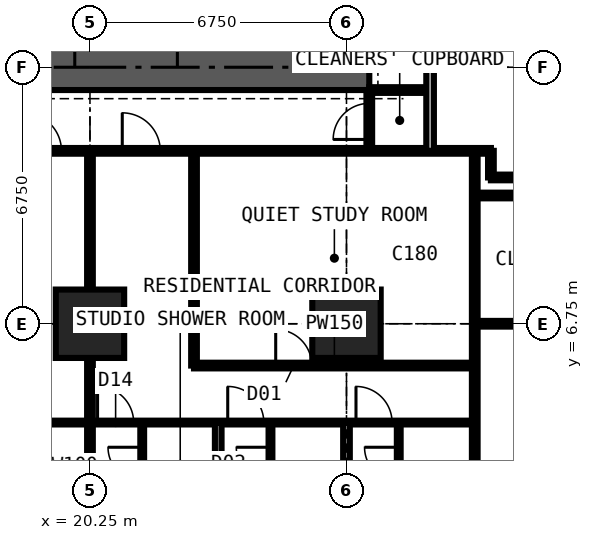
"""IFC4 building model, lengths in metres.
Left out: names, types, materials, properties, quantities, classifications, styles, units other than length and angle.
Written with IfcOpenShell. Run it as: python <this file> out.ifc"""

import sys

from ifc_helpers import new_model, si_unit, direction, frame, frame_2d, origin, origin_2d, place, context, subcontext, project, spatial, rectangle, extrude, element, fill, save


model = new_model("IFC4")
c1 = context("Model", 3, precision=1e-05, world=origin(), true_north=direction((0.0, 1.0)))
c2 = subcontext(c1, "Body", "Model", "MODEL_VIEW")
j1 = project(units=[si_unit("LENGTHUNIT", "METRE"), si_unit("PLANEANGLEUNIT", "RADIAN")], contexts=[c1])
p1 = place(None, origin())
s1 = spatial("IfcSite", under=j1, at=p1, CompositionType="ELEMENT")
p2 = place(p1, origin())
s2 = spatial("IfcBuilding", under=s1, at=p2, CompositionType="ELEMENT")
p3 = place(p2, frame((0.0, 0.0, 90.9)))
s3 = spatial("IfcBuildingStorey", under=s2, at=p3, CompositionType="ELEMENT", Elevation=90.9)
for number, where, z_axis, x_axis in (
    (1, (20.25, 6.75, 0.0), (0.0, 0.0, 1.0), (1.0, 0.0, 0.0)),
    (2, (27.0, 6.75, 0.0), (0.0, 0.0, 1.0), (1.0, 0.0, 0.0)),
):
    element("IfcColumn", number, at=place(p3, frame(where, z_axis=z_axis, x_axis=x_axis)), inside=s3, PredefinedType="COLUMN", context=c2, shape_type="SweptSolid", body=[
        extrude(rectangle(XDim=1.8, YDim=1.8, at=origin_2d()), origin(), (0.0, 0.0, 1.0), 3.6),
    ])
p4 = place(p3, frame((12.9, 13.5, 0.0), z_axis=(0.0, 0.0, 1.0), x_axis=(1.0, 0.0, 0.0)))
e3 = element("IfcWall", 3, at=p4, inside=s3, PredefinedType="SHEAR", context=c2, shape_type="SweptSolid", body=[
    extrude(rectangle(XDim=14.7, YDim=1.2, at=frame_2d((7.35, 0.0))), origin(), (0.0, 0.0, 1.0), 3.6),
])
p5 = place(p3, frame((6.75, 4.15, 0.0), z_axis=(0.0, 0.0, 1.0), x_axis=(1.0, 0.0, 0.0)))
e4 = element("IfcWall", 4, at=p5, inside=s3, PredefinedType="PARTITIONING", context=c2, shape_type="SweptSolid", body=[
    extrude(rectangle(XDim=23.625, YDim=0.1, at=frame_2d((11.812, 0.0))), origin(), (0.0, 0.0, 1.0), 3.375),
])
p6 = place(p5, frame((2.85, 0.0, 0.0)))
e5 = element("IfcOpeningElement", 5, at=p6, cuts=e4, PredefinedType="OPENING", context=c2, shape_type="SweptSolid", body=[
    extrude(rectangle(XDim=1.0, YDim=2.2, at=frame_2d((0.5, 1.1))), frame((0.0, 0.06, 0.0), z_axis=(0.0, -1.0, 0.0), x_axis=(1.0, 0.0, 0.0)), (0.0, 0.0, 1.0), 0.12),
])
p7 = place(p5, frame((6.95, 0.0, 0.0)))
e6 = element("IfcOpeningElement", 6, at=p7, cuts=e4, PredefinedType="OPENING", context=c2, shape_type="SweptSolid", body=[
    extrude(rectangle(XDim=0.95, YDim=2.2, at=frame_2d((0.475, 1.1))), frame((0.0, 0.06, 0.0), z_axis=(0.0, -1.0, 0.0), x_axis=(1.0, 0.0, 0.0)), (0.0, 0.0, 1.0), 0.12),
])
p8 = place(p5, frame((10.375, 0.0, 0.0)))
e7 = element("IfcOpeningElement", 7, at=p8, cuts=e4, PredefinedType="OPENING", context=c2, shape_type="SweptSolid", body=[
    extrude(rectangle(XDim=0.95, YDim=2.2, at=frame_2d((0.475, 1.1))), frame((0.0, 0.06, 0.0), z_axis=(0.0, -1.0, 0.0), x_axis=(1.0, 0.0, 0.0)), (0.0, 0.0, 1.0), 0.12),
])
p9 = place(p5, frame((13.7, 0.0, 0.0)))
e8 = element("IfcOpeningElement", 8, at=p9, cuts=e4, PredefinedType="OPENING", context=c2, shape_type="SweptSolid", body=[
    extrude(rectangle(XDim=0.95, YDim=2.2, at=frame_2d((0.475, 1.1))), frame((0.0, 0.06, 0.0), z_axis=(0.0, -1.0, 0.0), x_axis=(1.0, 0.0, 0.0)), (0.0, 0.0, 1.0), 0.12),
])
p10 = place(p5, frame((17.125, 0.0, 0.0)))
e9 = element("IfcOpeningElement", 9, at=p10, cuts=e4, PredefinedType="OPENING", context=c2, shape_type="SweptSolid", body=[
    extrude(rectangle(XDim=0.95, YDim=2.2, at=frame_2d((0.475, 1.1))), frame((0.0, 0.06, 0.0), z_axis=(0.0, -1.0, 0.0), x_axis=(1.0, 0.0, 0.0)), (0.0, 0.0, 1.0), 0.12),
])
p11 = place(p5, frame((20.5, 0.0, 0.0)))
e10 = element("IfcOpeningElement", 10, at=p11, cuts=e4, PredefinedType="OPENING", context=c2, shape_type="SweptSolid", body=[
    extrude(rectangle(XDim=0.95, YDim=2.2, at=frame_2d((0.475, 1.1))), frame((0.0, 0.06, 0.0), z_axis=(0.0, -1.0, 0.0), x_axis=(1.0, 0.0, 0.0)), (0.0, 0.0, 1.0), 0.12),
])
p12 = place(p3, frame((10.125, 11.3, 0.0), z_axis=(0.0, 0.0, 1.0), x_axis=(1.0, 0.0, 0.0)))
e11 = element("IfcWall", 11, at=p12, inside=s3, PredefinedType="PARTITIONING", context=c2, shape_type="SweptSolid", body=[
    extrude(rectangle(XDim=20.675, YDim=0.15, at=frame_2d((10.337, 0.0))), origin(), (0.0, 0.0, 1.0), 3.375),
])
p13 = place(p12, frame((8.375, 0.0, 0.0)))
e12 = element("IfcOpeningElement", 12, at=p13, cuts=e11, PredefinedType="OPENING", context=c2, shape_type="SweptSolid", body=[
    extrude(rectangle(XDim=1.0, YDim=2.2, at=frame_2d((0.5, 1.1))), frame((0.0, 0.085, 0.0), z_axis=(0.0, -1.0, 0.0), x_axis=(1.0, 0.0, 0.0)), (0.0, 0.0, 1.0), 0.17),
])
p14 = place(p12, frame((10.975, 0.0, 0.0)))
e13 = element("IfcOpeningElement", 13, at=p14, cuts=e11, PredefinedType="OPENING", context=c2, shape_type="SweptSolid", body=[
    extrude(rectangle(XDim=1.0, YDim=2.2, at=frame_2d((0.5, 1.1))), frame((0.0, 0.085, 0.0), z_axis=(0.0, -1.0, 0.0), x_axis=(1.0, 0.0, 0.0)), (0.0, 0.0, 1.0), 0.17),
])
p15 = place(p12, frame((3.925, 0.0, 0.0)))
e14 = element("IfcOpeningElement", 14, at=p15, cuts=e11, PredefinedType="OPENING", context=c2, shape_type="SweptSolid", body=[
    extrude(rectangle(XDim=0.95, YDim=2.2, at=frame_2d((0.475, 1.1))), frame((0.0, 0.085, 0.0), z_axis=(0.0, -1.0, 0.0), x_axis=(1.0, 0.0, 0.0)), (0.0, 0.0, 1.0), 0.17),
])
p16 = place(p3, frame((20.25, -0.734, 0.0), z_axis=(0.0, 0.0, 1.0), x_axis=(0.0, 1.0, 0.0)))
e15 = element("IfcWall", 15, at=p16, inside=s3, PredefinedType="PARTITIONING", context=c2, shape_type="SweptSolid", body=[
    extrude(rectangle(XDim=12.034, YDim=0.15, at=frame_2d((6.017, 0.0))), origin(), (0.0, 0.0, 1.0), 2.61),
])
p17 = place(p3, frame((21.625, 1.95, 0.0), z_axis=(0.0, 0.0, 1.0), x_axis=(0.0, 1.0, 0.0)))
e16 = element("IfcWall", 16, at=p17, inside=s3, PredefinedType="PARTITIONING", context=c2, shape_type="SweptSolid", body=[
    extrude(rectangle(XDim=2.2, YDim=0.1, at=frame_2d((1.1, 0.0))), origin(), (0.0, 0.0, 1.0), 3.375),
])
p18 = place(p17, frame((0.65, 0.0, 0.0)))
e17 = element("IfcOpeningElement", 17, at=p18, cuts=e16, PredefinedType="OPENING", context=c2, shape_type="SweptSolid", body=[
    extrude(rectangle(XDim=0.9, YDim=2.2, at=frame_2d((0.45, 1.1))), frame((0.0, 0.06, 0.0), z_axis=(0.0, -1.0, 0.0), x_axis=(1.0, 0.0, 0.0)), (0.0, 0.0, 1.0), 0.12),
])
p19 = place(p3, frame((22.988, 5.65, 0.0), z_axis=(0.0, 0.0, 1.0), x_axis=(1.0, 0.0, 0.0)))
e18 = element("IfcWall", 18, at=p19, inside=s3, PredefinedType="PARTITIONING", context=c2, shape_type="SweptSolid", body=[
    extrude(rectangle(XDim=7.387, YDim=0.15, at=frame_2d((3.694, 0.0))), origin(), (0.0, 0.0, 1.0), 3.375),
])
p20 = place(p19, frame((2.15, 0.0, 0.0)))
e19 = element("IfcOpeningElement", 19, at=p20, cuts=e18, PredefinedType="OPENING", context=c2, shape_type="SweptSolid", body=[
    extrude(rectangle(XDim=0.95, YDim=2.2, at=frame_2d((0.475, 1.1))), frame((0.0, 0.085, 0.0), z_axis=(0.0, -1.0, 0.0), x_axis=(1.0, 0.0, 0.0)), (0.0, 0.0, 1.0), 0.17),
])
p21 = place(p3, frame((22.988, 5.65, 0.0), z_axis=(0.0, 0.0, 1.0), x_axis=(0.0, 1.0, 0.0)))
e20 = element("IfcWall", 20, at=p21, inside=s3, PredefinedType="PARTITIONING", context=c2, shape_type="SweptSolid", body=[
    extrude(rectangle(XDim=5.65, YDim=0.15, at=frame_2d((2.825, 0.0))), origin(), (0.0, 0.0, 1.0), 3.375),
])
p22 = place(p3, frame((23.625, -0.734, 0.0), z_axis=(0.0, 0.0, 1.0), x_axis=(0.0, 1.0, 0.0)))
e21 = element("IfcWall", 21, at=p22, inside=s3, PredefinedType="PARTITIONING", context=c2, shape_type="SweptSolid", body=[
    extrude(rectangle(XDim=4.884, YDim=0.175, at=frame_2d((2.442, 0.0))), origin(), (0.0, 0.0, 1.0), 3.375),
])
p23 = place(p3, frame((25.0, 1.95, 0.0), z_axis=(0.0, 0.0, 1.0), x_axis=(0.0, 1.0, 0.0)))
e22 = element("IfcWall", 22, at=p23, inside=s3, PredefinedType="PARTITIONING", context=c2, shape_type="SweptSolid", body=[
    extrude(rectangle(XDim=2.2, YDim=0.1, at=frame_2d((1.1, 0.0))), origin(), (0.0, 0.0, 1.0), 3.375),
])
p24 = place(p23, frame((0.65, 0.0, 0.0)))
e23 = element("IfcOpeningElement", 23, at=p24, cuts=e22, PredefinedType="OPENING", context=c2, shape_type="SweptSolid", body=[
    extrude(rectangle(XDim=0.9, YDim=2.2, at=frame_2d((0.45, 1.1))), frame((0.0, 0.06, 0.0), z_axis=(0.0, -1.0, 0.0), x_axis=(1.0, 0.0, 0.0)), (0.0, 0.0, 1.0), 0.12),
])
p25 = place(p3, frame((27.0, -0.734, 0.0), z_axis=(0.0, 0.0, 1.0), x_axis=(0.0, 1.0, 0.0)))
e24 = element("IfcWall", 24, at=p25, inside=s3, PredefinedType="PARTITIONING", context=c2, shape_type="SweptSolid", body=[
    extrude(rectangle(XDim=4.884, YDim=0.175, at=frame_2d((2.442, 0.0))), origin(), (0.0, 0.0, 1.0), 2.877),
])
p26 = place(p3, frame((27.6, 11.3, 0.0), z_axis=(0.0, 0.0, 1.0), x_axis=(0.0, 1.0, 0.0)))
e25 = element("IfcWall", 25, at=p26, inside=s3, PredefinedType="PARTITIONING", context=c2, shape_type="SweptSolid", body=[
    extrude(rectangle(XDim=1.6, YDim=0.15, at=frame_2d((0.8, 0.0))), origin(), (0.0, 0.0, 1.0), 3.375),
])
p27 = place(p26, frame((0.3, 0.0, 0.0)))
e26 = element("IfcOpeningElement", 26, at=p27, cuts=e25, PredefinedType="OPENING", context=c2, shape_type="SweptSolid", body=[
    extrude(rectangle(XDim=0.95, YDim=2.2, at=frame_2d((0.475, 1.1))), frame((0.0, 0.085, 0.0), z_axis=(0.0, -1.0, 0.0), x_axis=(1.0, 0.0, 0.0)), (0.0, 0.0, 1.0), 0.17),
])
p28 = place(p3, frame((27.6, 12.9, 0.0), z_axis=(0.0, 0.0, 1.0), x_axis=(1.0, 0.0, 0.0)))
e27 = element("IfcWall", 27, at=p28, inside=s3, PredefinedType="PARTITIONING", context=c2, shape_type="SweptSolid", body=[
    extrude(rectangle(XDim=1.6, YDim=0.15, at=frame_2d((0.8, 0.0))), origin(), (0.0, 0.0, 1.0), 2.806),
])
p29 = place(p3, frame((28.375, 1.95, 0.0), z_axis=(0.0, 0.0, 1.0), x_axis=(0.0, 1.0, 0.0)))
e28 = element("IfcWall", 28, at=p29, inside=s3, PredefinedType="PARTITIONING", context=c2, shape_type="SweptSolid", body=[
    extrude(rectangle(XDim=2.2, YDim=0.1, at=frame_2d((1.1, 0.0))), origin(), (0.0, 0.0, 1.0), 3.375),
])
p30 = place(p29, frame((0.65, 0.0, 0.0)))
e29 = element("IfcOpeningElement", 29, at=p30, cuts=e28, PredefinedType="OPENING", context=c2, shape_type="SweptSolid", body=[
    extrude(rectangle(XDim=0.9, YDim=2.2, at=frame_2d((0.45, 1.1))), frame((0.0, 0.06, 0.0), z_axis=(0.0, -1.0, 0.0), x_axis=(1.0, 0.0, 0.0)), (0.0, 0.0, 1.0), 0.12),
])
p31 = place(p3, frame((29.2, 11.3, 0.0), z_axis=(0.0, 0.0, 1.0), x_axis=(0.0, 1.0, 0.0)))
e30 = element("IfcWall", 30, at=p31, inside=s3, PredefinedType="PARTITIONING", context=c2, shape_type="SweptSolid", body=[
    extrude(rectangle(XDim=17.9, YDim=0.2, at=frame_2d((8.95, 0.0))), origin(), (0.0, 0.0, 1.0), 3.375),
])
p32 = place(p31, frame((8.35, 0.0, 0.0)))
e31 = element("IfcOpeningElement", 31, at=p32, cuts=e30, PredefinedType="OPENING", context=c2, shape_type="SweptSolid", body=[
    extrude(rectangle(XDim=1.2, YDim=2.2, at=frame_2d((0.6, 1.1))), frame((0.0, 0.11, 0.0), z_axis=(0.0, -1.0, 0.0), x_axis=(1.0, 0.0, 0.0)), (0.0, 0.0, 1.0), 0.22),
])
p33 = place(p3, frame((30.375, -0.734, 0.0), z_axis=(0.0, 0.0, 1.0), x_axis=(0.0, 1.0, 0.0)))
e32 = element("IfcWall", 32, at=p33, inside=s3, PredefinedType="PARTITIONING", context=c2, shape_type="SweptSolid", body=[
    extrude(rectangle(XDim=12.034, YDim=0.15, at=frame_2d((6.017, 0.0))), origin(), (0.0, 0.0, 1.0), 3.375),
])
p34 = place(p3, frame((30.375, 6.75, 0.0), z_axis=(0.0, 0.0, 1.0), x_axis=(1.0, 0.0, 0.0)))
e33 = element("IfcWall", 33, at=p34, inside=s3, PredefinedType="PARTITIONING", context=c2, shape_type="SweptSolid", body=[
    extrude(rectangle(XDim=10.859, YDim=0.15, at=frame_2d((5.429, 0.0))), origin(), (0.0, 0.0, 1.0), 2.877),
])
p35 = place(p34, frame((1.45, 0.0, 0.0)))
e34 = element("IfcOpeningElement", 34, at=p35, cuts=e33, PredefinedType="OPENING", context=c2, shape_type="SweptSolid", body=[
    extrude(rectangle(XDim=1.0, YDim=2.2, at=frame_2d((0.5, 1.1))), frame((0.0, 0.085, 0.0), z_axis=(0.0, -1.0, 0.0), x_axis=(1.0, 0.0, 0.0)), (0.0, 0.0, 1.0), 0.17),
])
p36 = place(p3, frame((30.375, 10.125, 0.0), z_axis=(0.0, 0.0, 1.0), x_axis=(1.0, 0.0, 0.0)))
e35 = element("IfcWall", 35, at=p36, inside=s3, PredefinedType="PARTITIONING", context=c2, shape_type="SweptSolid", body=[
    extrude(rectangle(XDim=10.859, YDim=0.15, at=frame_2d((5.429, 0.0))), origin(), (0.0, 0.0, 1.0), 3.375),
])
p37 = place(p36, frame((2.5, 0.0, 0.0)))
e36 = element("IfcOpeningElement", 36, at=p37, cuts=e35, PredefinedType="OPENING", context=c2, shape_type="SweptSolid", body=[
    extrude(rectangle(XDim=1.0, YDim=2.2, at=frame_2d((0.5, 1.1))), frame((0.0, 0.085, 0.0), z_axis=(0.0, -1.0, 0.0), x_axis=(1.0, 0.0, 0.0)), (0.0, 0.0, 1.0), 0.17),
])
p38 = place(p3, frame((30.8, 10.6, 0.0), z_axis=(0.0, 0.0, 1.0), x_axis=(0.0, 1.0, 0.0)))
e37 = element("IfcWall", 37, at=p38, inside=s3, PredefinedType="PARTITIONING", context=c2, shape_type="SweptSolid", body=[
    extrude(rectangle(XDim=0.7, YDim=0.15, at=frame_2d((0.35, 0.0))), origin(), (0.0, 0.0, 1.0), 3.375),
])
p39 = place(p3, frame((30.8, 10.6, 0.0), z_axis=(0.0, 0.0, 1.0), x_axis=(1.0, 0.0, 0.0)))
e38 = element("IfcWall", 38, at=p39, inside=s3, PredefinedType="PARTITIONING", context=c2, shape_type="SweptSolid", body=[
    extrude(rectangle(XDim=1.85, YDim=0.15, at=frame_2d((0.925, 0.0))), origin(), (0.0, 0.0, 1.0), 3.375),
])
p40 = place(p27, origin())
e39 = element("IfcDoor", 39, at=p40, inside=s3, OperationType="SINGLE_SWING_LEFT", PredefinedType="DOOR", context=c2, shape_type="SweptSolid", body=[
    extrude(rectangle(XDim=0.95, YDim=2.2, at=frame_2d((0.475, 1.1))), frame((0.0, 0.025, 0.0), z_axis=(0.0, -1.0, 0.0), x_axis=(1.0, 0.0, 0.0)), (0.0, 0.0, 1.0), 0.05),
])
fill(e26, e39)
p41 = place(p13, origin())
e40 = element("IfcDoor", 40, at=p41, inside=s3, OperationType="SINGLE_SWING_LEFT", PredefinedType="DOOR", context=c2, shape_type="SweptSolid", body=[
    extrude(rectangle(XDim=1.0, YDim=2.2, at=frame_2d((0.5, 1.1))), frame((0.0, 0.025, 0.0), z_axis=(0.0, -1.0, 0.0), x_axis=(1.0, 0.0, 0.0)), (0.0, 0.0, 1.0), 0.05),
])
fill(e12, e40)
p42 = place(p9, origin())
e41 = element("IfcDoor", 41, at=p42, inside=s3, OperationType="SINGLE_SWING_LEFT", PredefinedType="DOOR", context=c2, shape_type="SweptSolid", body=[
    extrude(rectangle(XDim=0.95, YDim=2.2, at=frame_2d((0.475, 1.1))), frame((0.0, 0.025, 0.0), z_axis=(0.0, -1.0, 0.0), x_axis=(1.0, 0.0, 0.0)), (0.0, 0.0, 1.0), 0.05),
])
fill(e8, e41)
p43 = place(p18, origin())
e42 = element("IfcDoor", 42, at=p43, inside=s3, OperationType="SINGLE_SWING_RIGHT", PredefinedType="DOOR", context=c2, shape_type="SweptSolid", body=[
    extrude(rectangle(XDim=0.9, YDim=2.2, at=frame_2d((0.45, 1.1))), frame((0.0, 0.025, 0.0), z_axis=(0.0, -1.0, 0.0), x_axis=(1.0, 0.0, 0.0)), (0.0, 0.0, 1.0), 0.05),
])
fill(e17, e42)
p44 = place(p10, origin())
e43 = element("IfcDoor", 43, at=p44, inside=s3, OperationType="SINGLE_SWING_LEFT", PredefinedType="DOOR", context=c2, shape_type="SweptSolid", body=[
    extrude(rectangle(XDim=0.95, YDim=2.2, at=frame_2d((0.475, 1.1))), frame((0.0, 0.025, 0.0), z_axis=(0.0, -1.0, 0.0), x_axis=(1.0, 0.0, 0.0)), (0.0, 0.0, 1.0), 0.05),
])
fill(e9, e43)
p45 = place(p24, origin())
e44 = element("IfcDoor", 44, at=p45, inside=s3, OperationType="SINGLE_SWING_RIGHT", PredefinedType="DOOR", context=c2, shape_type="SweptSolid", body=[
    extrude(rectangle(XDim=0.9, YDim=2.2, at=frame_2d((0.45, 1.1))), frame((0.0, 0.025, 0.0), z_axis=(0.0, -1.0, 0.0), x_axis=(1.0, 0.0, 0.0)), (0.0, 0.0, 1.0), 0.05),
])
fill(e23, e44)
p46 = place(p11, origin())
e45 = element("IfcDoor", 45, at=p46, inside=s3, OperationType="SINGLE_SWING_LEFT", PredefinedType="DOOR", context=c2, shape_type="SweptSolid", body=[
    extrude(rectangle(XDim=0.95, YDim=2.2, at=frame_2d((0.475, 1.1))), frame((0.0, 0.025, 0.0), z_axis=(0.0, -1.0, 0.0), x_axis=(1.0, 0.0, 0.0)), (0.0, 0.0, 1.0), 0.05),
])
fill(e10, e45)
p47 = place(p30, origin())
e46 = element("IfcDoor", 46, at=p47, inside=s3, OperationType="SINGLE_SWING_RIGHT", PredefinedType="DOOR", context=c2, shape_type="SweptSolid", body=[
    extrude(rectangle(XDim=0.9, YDim=2.2, at=frame_2d((0.45, 1.1))), frame((0.0, 0.025, 0.0), z_axis=(0.0, -1.0, 0.0), x_axis=(1.0, 0.0, 0.0)), (0.0, 0.0, 1.0), 0.05),
])
fill(e29, e46)
p48 = place(p14, origin())
e47 = element("IfcDoor", 47, at=p48, inside=s3, OperationType="SINGLE_SWING_LEFT", PredefinedType="DOOR", context=c2, shape_type="SweptSolid", body=[
    extrude(rectangle(XDim=1.0, YDim=2.2, at=frame_2d((0.5, 1.1))), frame((0.0, 0.025, 0.0), z_axis=(0.0, -1.0, 0.0), x_axis=(1.0, 0.0, 0.0)), (0.0, 0.0, 1.0), 0.05),
])
fill(e13, e47)
p49 = place(p20, origin())
e48 = element("IfcDoor", 48, at=p49, inside=s3, OperationType="SINGLE_SWING_LEFT", PredefinedType="DOOR", context=c2, shape_type="SweptSolid", body=[
    extrude(rectangle(XDim=0.95, YDim=2.2, at=frame_2d((0.475, 1.1))), frame((0.0, 0.025, 0.0), z_axis=(0.0, -1.0, 0.0), x_axis=(1.0, 0.0, 0.0)), (0.0, 0.0, 1.0), 0.05),
])
fill(e19, e48)
save(model, sys.argv[1])
